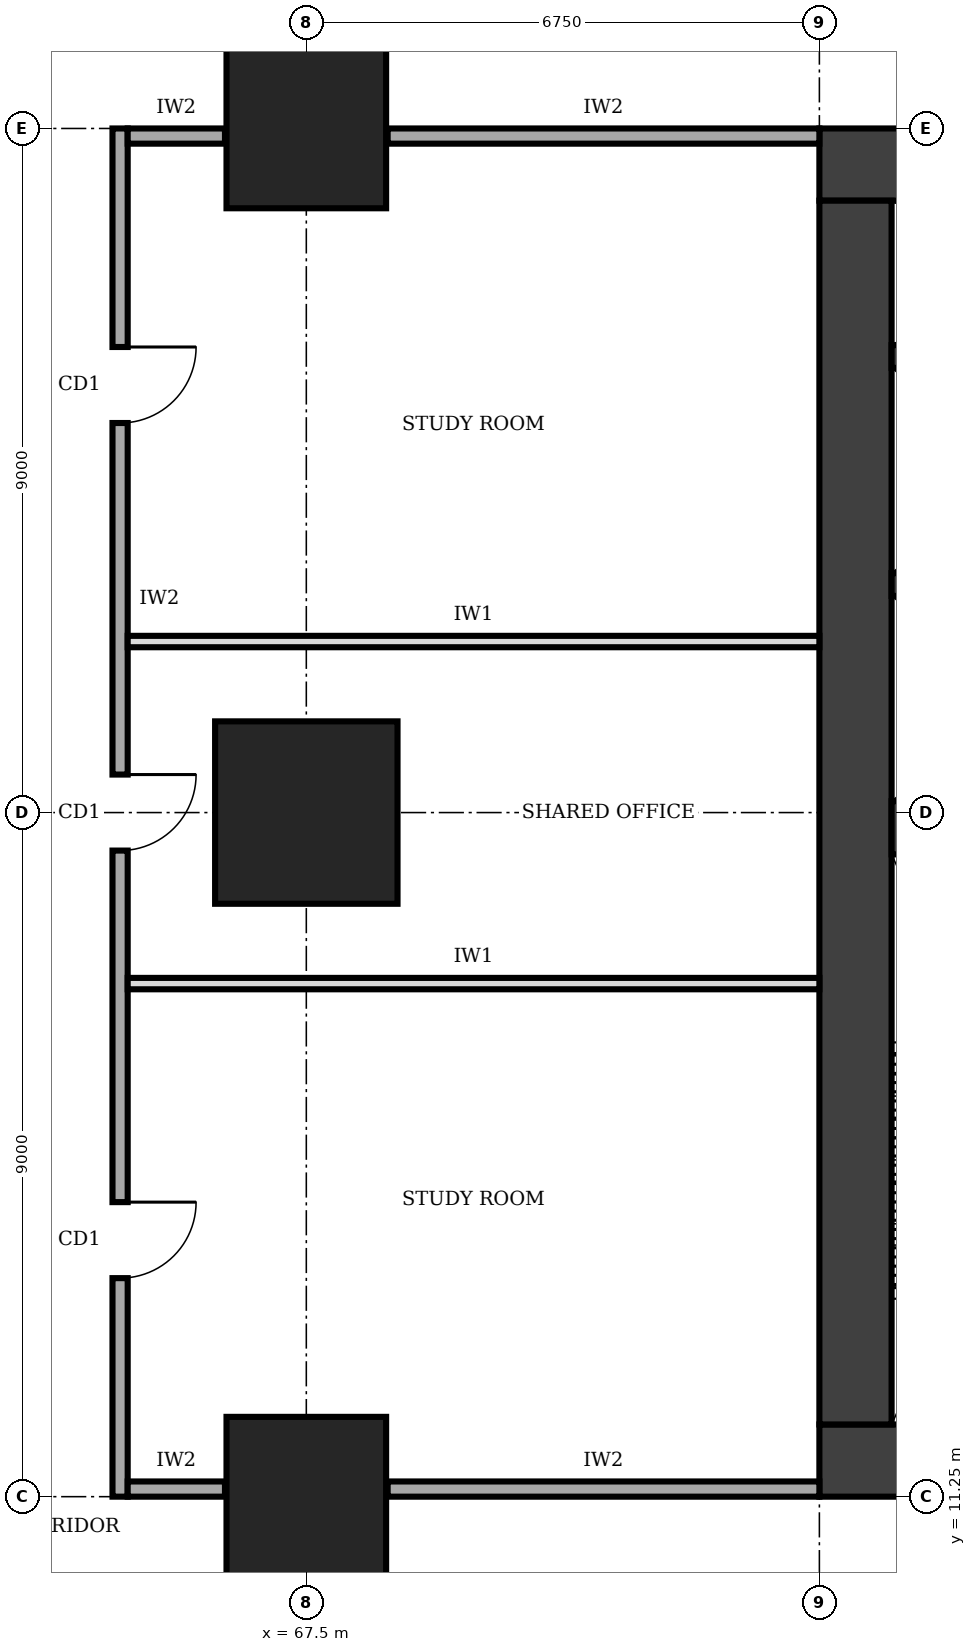
"""IFC4 building model, lengths in metres.
Left out: names, types, materials, properties, quantities, classifications, styles, units other than length and angle.
Written with IfcOpenShell. Run it as: python <this file> out.ifc"""

import sys

from ifc_helpers import new_model, si_unit, direction, frame, frame_2d, origin, origin_2d, place, context, subcontext, project, spatial, rectangle, extrude, element, fill, save


model = new_model("IFC4")
c1 = context("Model", 3, precision=1e-05, world=origin(), true_north=direction((0.0, 1.0)))
c2 = subcontext(c1, "Body", "Model", "MODEL_VIEW")
j1 = project(units=[si_unit("LENGTHUNIT", "METRE"), si_unit("PLANEANGLEUNIT", "RADIAN")], contexts=[c1])
p1 = place(None, origin())
s1 = spatial("IfcSite", under=j1, at=p1, CompositionType="ELEMENT")
p2 = place(p1, origin())
s2 = spatial("IfcBuilding", under=s1, at=p2, CompositionType="ELEMENT")
p3 = place(p2, frame((0.0, 0.0, 101.0)))
s3 = spatial("IfcBuildingStorey", under=s2, at=p3, CompositionType="ELEMENT", Elevation=101.0)
p4 = place(p3, frame((74.25, 11.725, 0.0), z_axis=(0.0, 0.0, 1.0), x_axis=(1.0, 0.0, 0.0)))
e1 = element("IfcWall", 1, at=p4, inside=s3, PredefinedType="SHEAR", context=c2, shape_type="SweptSolid", body=[
    extrude(rectangle(XDim=13.5, YDim=0.95, at=frame_2d((6.75, 0.0))), origin(), (0.0, 0.0, 1.0), 4.0),
])
p5 = place(p4, frame((4.75, 0.0, 0.0)))
e2 = element("IfcOpeningElement", 2, at=p5, cuts=e1, PredefinedType="OPENING", context=c2, shape_type="SweptSolid", body=[
    extrude(rectangle(XDim=1.0, YDim=2.1, at=frame_2d((0.5, 1.05))), frame((0.0, 0.485, 0.0), z_axis=(0.0, -1.0, 0.0), x_axis=(1.0, 0.0, 0.0)), (0.0, 0.0, 1.0), 0.97),
])
p6 = place(p3, frame((87.75, 28.775, 0.0), z_axis=(0.0, 0.0, 1.0), x_axis=(-1.0, 0.0, 0.0)))
e3 = element("IfcWall", 3, at=p6, inside=s3, PredefinedType="SHEAR", context=c2, shape_type="SweptSolid", body=[
    extrude(rectangle(XDim=13.5, YDim=0.95, at=frame_2d((6.75, 0.0))), origin(), (0.0, 0.0, 1.0), 4.0),
])
p7 = place(p6, frame((4.75, 0.0, 0.0)))
e4 = element("IfcOpeningElement", 4, at=p7, cuts=e3, PredefinedType="OPENING", context=c2, shape_type="SweptSolid", body=[
    extrude(rectangle(XDim=1.8, YDim=2.1, at=frame_2d((0.9, 1.05))), frame((0.0, 0.485, 0.0), z_axis=(0.0, -1.0, 0.0), x_axis=(1.0, 0.0, 0.0)), (0.0, 0.0, 1.0), 0.97),
])
p8 = place(p3, frame((74.725, 28.3, 0.0), z_axis=(0.0, 0.0, 1.0), x_axis=(0.0, -1.0, 0.0)))
e5 = element("IfcWall", 5, at=p8, inside=s3, PredefinedType="SHEAR", context=c2, shape_type="SweptSolid", body=[
    extrude(rectangle(XDim=16.1, YDim=0.95, at=frame_2d((8.05, 0.0))), origin(), (0.0, 0.0, 1.0), 4.0),
])
p9 = place(p3, frame((75.2, 20.05, 0.0), z_axis=(0.0, 0.0, 1.0), x_axis=(1.0, 0.0, 0.0)))
e6 = element("IfcWall", 6, at=p9, inside=s3, PredefinedType="SHEAR", context=c2, shape_type="SweptSolid", body=[
    extrude(rectangle(XDim=3.4, YDim=0.7, at=frame_2d((1.7, 0.0))), origin(), (0.0, 0.0, 1.0), 4.0),
])
for number, where, z_axis, x_axis in (
    (7, (75.2, 23.25, 0.0), (0.0, 0.0, 1.0), (1.0, 0.0, 0.0)),
    (8, (75.2, 26.25, 0.0), (0.0, 0.0, 1.0), (1.0, 0.0, 0.0)),
):
    element("IfcWall", number, at=place(p3, frame(where, z_axis=z_axis, x_axis=x_axis)), inside=s3, PredefinedType="SHEAR", context=c2, shape_type="SweptSolid", body=[
        extrude(rectangle(XDim=3.4, YDim=0.3, at=frame_2d((1.7, 0.0))), origin(), (0.0, 0.0, 1.0), 4.0),
    ])
p10 = place(p3, frame((67.5, 11.25, 0.0), z_axis=(0.0, 0.0, 1.0), x_axis=(1.0, 0.0, 0.0)))
e9 = element("IfcColumn", 9, at=p10, inside=s3, PredefinedType="COLUMN", context=c2, shape_type="SweptSolid", body=[
    extrude(rectangle(XDim=2.1, YDim=2.1, at=origin_2d()), origin(), (0.0, 0.0, 1.0), 4.0),
])
p11 = place(p3, frame((67.5, 20.25, 0.0), z_axis=(0.0, 0.0, 1.0), x_axis=(1.0, 0.0, 0.0)))
e10 = element("IfcColumn", 10, at=p11, inside=s3, PredefinedType="COLUMN", context=c2, shape_type="SweptSolid", body=[
    extrude(rectangle(XDim=2.4, YDim=2.4, at=origin_2d()), origin(), (0.0, 0.0, 1.0), 4.0),
])
p12 = place(p3, frame((67.5, 29.25, 0.0), z_axis=(0.0, 0.0, 1.0), x_axis=(1.0, 0.0, 0.0)))
e11 = element("IfcColumn", 11, at=p12, inside=s3, PredefinedType="COLUMN", context=c2, shape_type="SweptSolid", body=[
    extrude(rectangle(XDim=2.1, YDim=2.1, at=origin_2d()), origin(), (0.0, 0.0, 1.0), 4.0),
])
p13 = place(p3, frame((65.05, 29.25, 0.0), z_axis=(0.0, 0.0, 1.0), x_axis=(0.0, -1.0, 0.0)))
e12 = element("IfcWall", 12, at=p13, inside=s3, PredefinedType="SOLIDWALL", context=c2, shape_type="SweptSolid", body=[
    extrude(rectangle(XDim=18.0, YDim=0.2, at=frame_2d((9.0, 0.0))), origin(), (0.0, 0.0, 1.0), 3.75),
])
p14 = place(p13, frame((14.125, 0.0, 0.0)))
e13 = element("IfcOpeningElement", 13, at=p14, cuts=e12, PredefinedType="OPENING", context=c2, shape_type="SweptSolid", body=[
    extrude(rectangle(XDim=1.0, YDim=2.1, at=frame_2d((0.5, 1.05))), frame((0.0, 0.11, 0.0), z_axis=(0.0, -1.0, 0.0), x_axis=(1.0, 0.0, 0.0)), (0.0, 0.0, 1.0), 0.22),
])
p15 = place(p13, frame((8.5, 0.0, 0.0)))
e14 = element("IfcOpeningElement", 14, at=p15, cuts=e12, PredefinedType="OPENING", context=c2, shape_type="SweptSolid", body=[
    extrude(rectangle(XDim=1.0, YDim=2.1, at=frame_2d((0.5, 1.05))), frame((0.0, 0.11, 0.0), z_axis=(0.0, -1.0, 0.0), x_axis=(1.0, 0.0, 0.0)), (0.0, 0.0, 1.0), 0.22),
])
p16 = place(p13, frame((2.875, 0.0, 0.0)))
e15 = element("IfcOpeningElement", 15, at=p16, cuts=e12, PredefinedType="OPENING", context=c2, shape_type="SweptSolid", body=[
    extrude(rectangle(XDim=1.0, YDim=2.1, at=frame_2d((0.5, 1.05))), frame((0.0, 0.11, 0.0), z_axis=(0.0, -1.0, 0.0), x_axis=(1.0, 0.0, 0.0)), (0.0, 0.0, 1.0), 0.22),
])
p17 = place(p3, frame((65.15, 11.35, 0.0), z_axis=(0.0, 0.0, 1.0), x_axis=(1.0, 0.0, 0.0)))
e16 = element("IfcWall", 16, at=p17, inside=s3, PredefinedType="SOLIDWALL", context=c2, shape_type="SweptSolid", body=[
    extrude(rectangle(XDim=1.28, YDim=0.2, at=frame_2d((0.64, 0.0))), origin(), (0.0, 0.0, 1.0), 3.75),
])
p18 = place(p3, frame((68.57, 11.35, 0.0), z_axis=(0.0, 0.0, 1.0), x_axis=(1.0, 0.0, 0.0)))
e17 = element("IfcWall", 17, at=p18, inside=s3, PredefinedType="SOLIDWALL", context=c2, shape_type="SweptSolid", body=[
    extrude(rectangle(XDim=5.68, YDim=0.2, at=frame_2d((2.84, 0.0))), origin(), (0.0, 0.0, 1.0), 3.75),
])
p19 = place(p3, frame((65.15, 29.15, 0.0), z_axis=(0.0, 0.0, 1.0), x_axis=(1.0, 0.0, 0.0)))
e18 = element("IfcWall", 18, at=p19, inside=s3, PredefinedType="SOLIDWALL", context=c2, shape_type="SweptSolid", body=[
    extrude(rectangle(XDim=1.28, YDim=0.2, at=frame_2d((0.64, 0.0))), origin(), (0.0, 0.0, 1.0), 3.75),
])
p20 = place(p3, frame((68.57, 29.15, 0.0), z_axis=(0.0, 0.0, 1.0), x_axis=(1.0, 0.0, 0.0)))
e19 = element("IfcWall", 19, at=p20, inside=s3, PredefinedType="SOLIDWALL", context=c2, shape_type="SweptSolid", body=[
    extrude(rectangle(XDim=5.68, YDim=0.2, at=frame_2d((2.84, 0.0))), origin(), (0.0, 0.0, 1.0), 3.75),
])
for number, where, z_axis, x_axis in (
    (20, (65.15, 18.0, 0.0), (0.0, 0.0, 1.0), (1.0, 0.0, 0.0)),
    (21, (65.15, 22.5, 0.0), (0.0, 0.0, 1.0), (1.0, 0.0, 0.0)),
):
    element("IfcWall", number, at=place(p3, frame(where, z_axis=z_axis, x_axis=x_axis)), inside=s3, PredefinedType="PARTITIONING", context=c2, shape_type="SweptSolid", body=[
        extrude(rectangle(XDim=9.1, YDim=0.15, at=frame_2d((4.55, 0.0))), origin(), (0.0, 0.0, 1.0), 3.75),
    ])
p21 = place(p14, origin())
e22 = element("IfcDoor", 22, at=p21, inside=s3, OperationType="SINGLE_SWING_LEFT", PredefinedType="DOOR", context=c2, shape_type="SweptSolid", body=[
    extrude(rectangle(XDim=1.0, YDim=2.1, at=frame_2d((0.5, 1.05))), frame((0.0, 0.025, 0.0), z_axis=(0.0, -1.0, 0.0), x_axis=(1.0, 0.0, 0.0)), (0.0, 0.0, 1.0), 0.05),
])
fill(e13, e22)
p22 = place(p15, origin())
e23 = element("IfcDoor", 23, at=p22, inside=s3, OperationType="SINGLE_SWING_LEFT", PredefinedType="DOOR", context=c2, shape_type="SweptSolid", body=[
    extrude(rectangle(XDim=1.0, YDim=2.1, at=frame_2d((0.5, 1.05))), frame((0.0, 0.025, 0.0), z_axis=(0.0, -1.0, 0.0), x_axis=(1.0, 0.0, 0.0)), (0.0, 0.0, 1.0), 0.05),
])
fill(e14, e23)
p23 = place(p16, origin())
e24 = element("IfcDoor", 24, at=p23, inside=s3, OperationType="SINGLE_SWING_LEFT", PredefinedType="DOOR", context=c2, shape_type="SweptSolid", body=[
    extrude(rectangle(XDim=1.0, YDim=2.1, at=frame_2d((0.5, 1.05))), frame((0.0, 0.025, 0.0), z_axis=(0.0, -1.0, 0.0), x_axis=(1.0, 0.0, 0.0)), (0.0, 0.0, 1.0), 0.05),
])
fill(e15, e24)
save(model, sys.argv[1])
